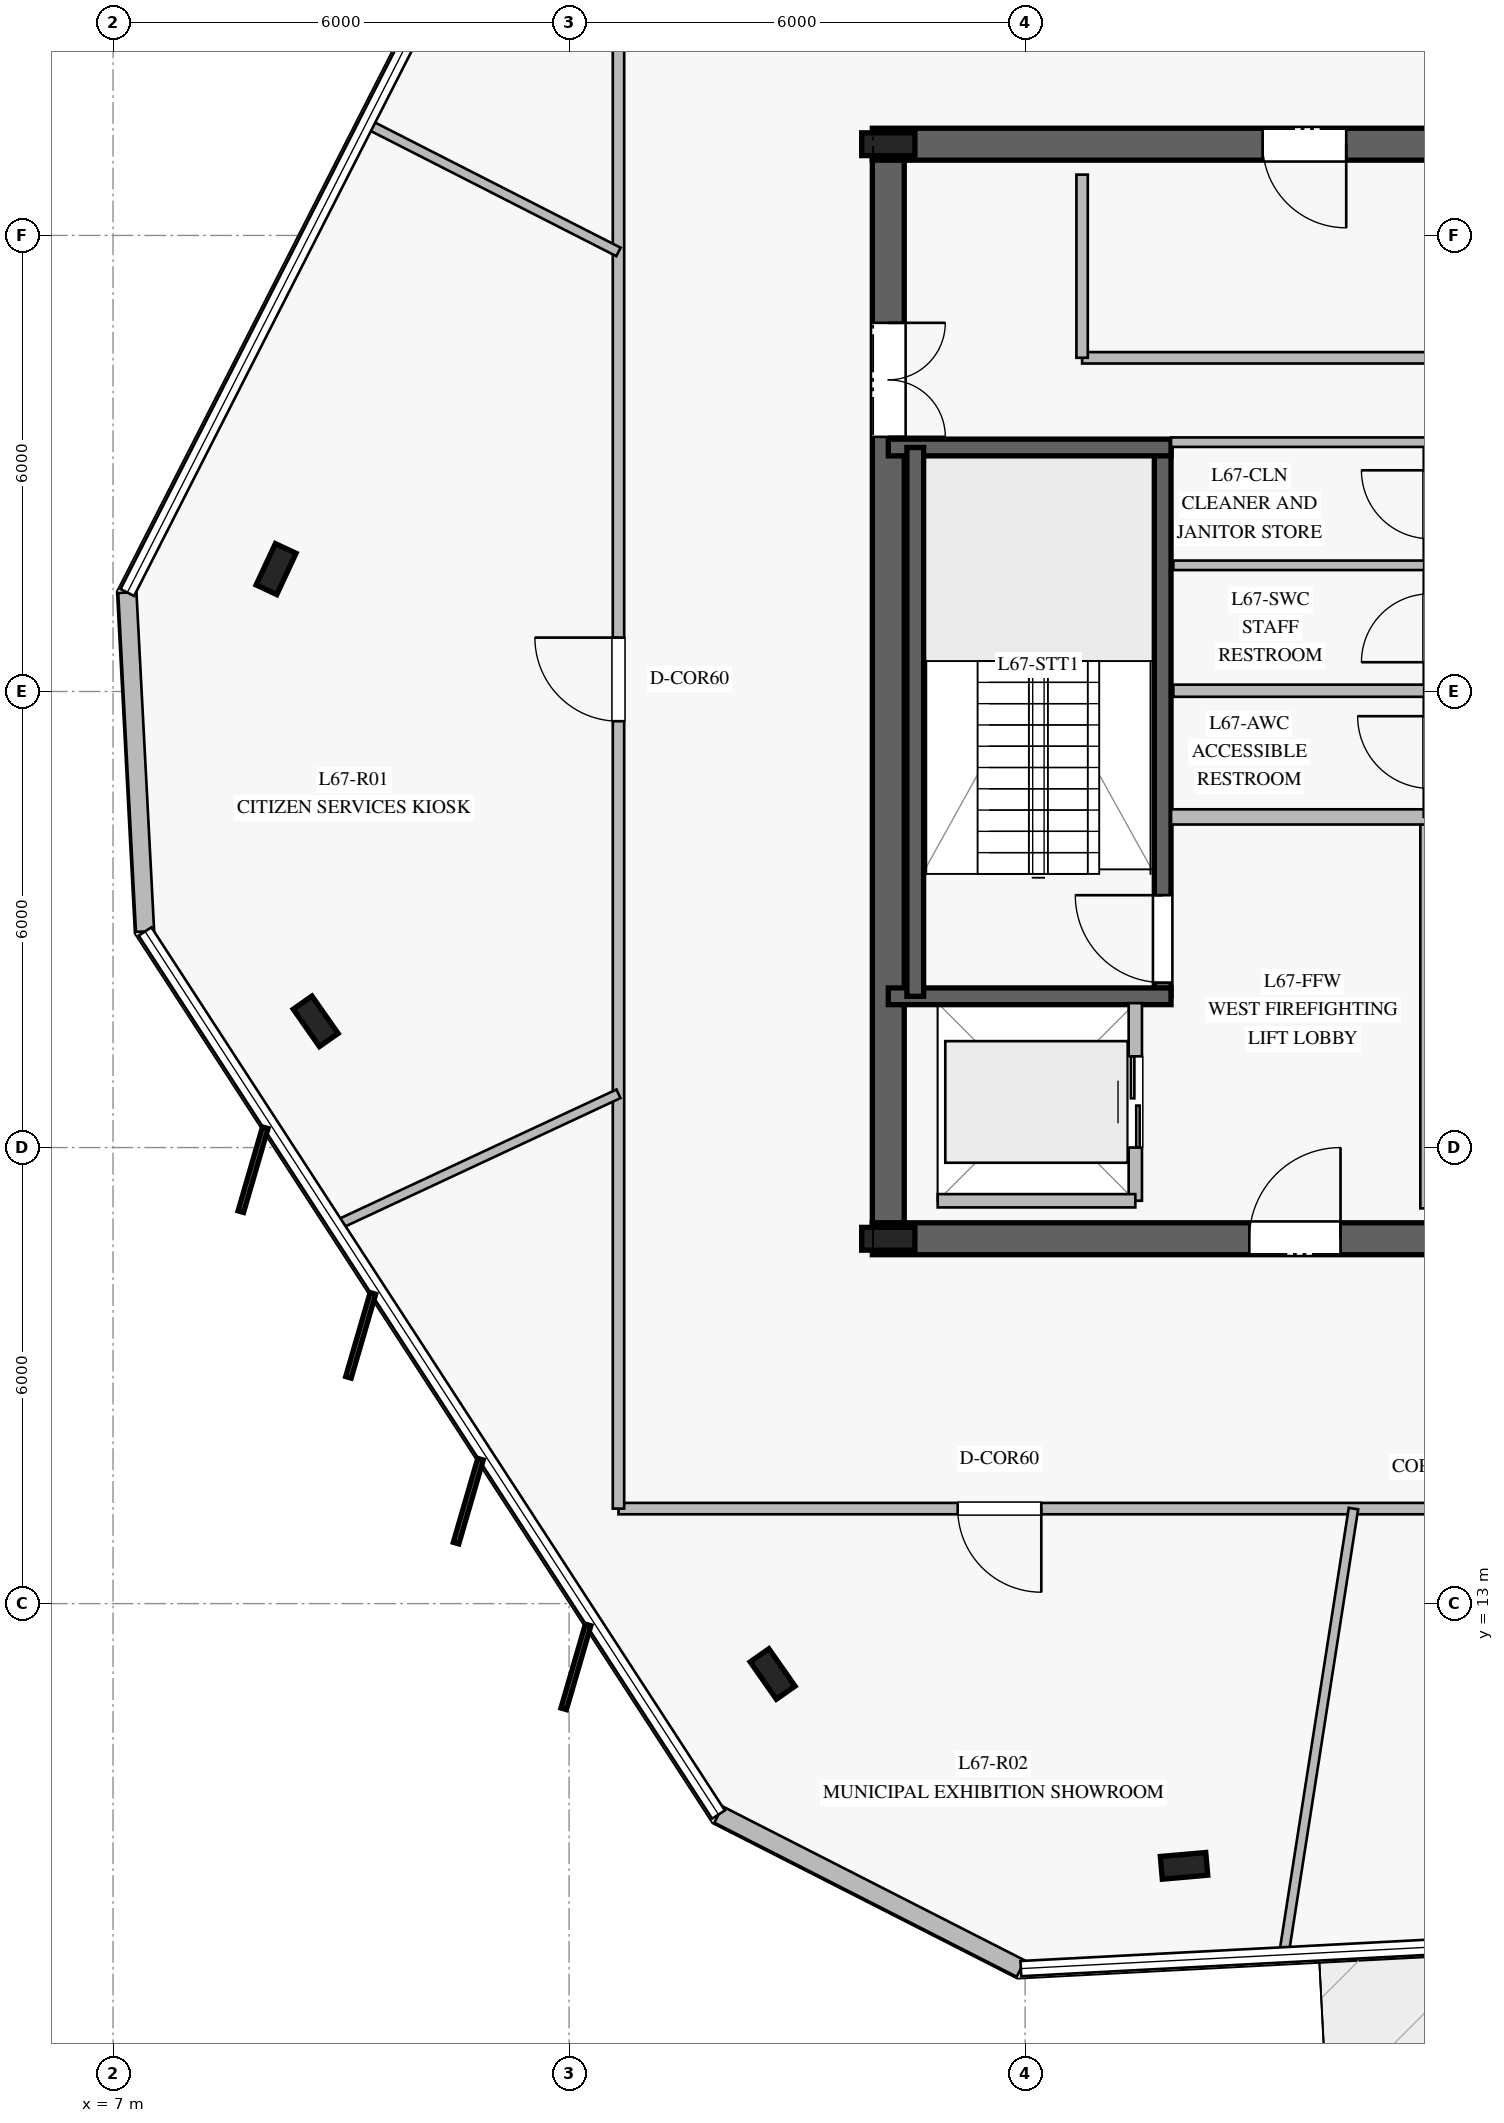
"""IFC4 building model, lengths in metres.
Left out: names, types, materials, properties, quantities, classifications, styles, units other than length and angle.
Written with IfcOpenShell. Run it as: python <this file> out.ifc"""

import sys

from ifc_helpers import new_model, si_unit, direction, frame, frame_2d, origin, origin_2d, place, context, subcontext, project, spatial, rectangle, i_section, extrude, element, fill, save


model = new_model("IFC4")
c1 = context("Model", 3, precision=1e-05, world=origin(), true_north=direction((0.0, 1.0)))
c2 = subcontext(c1, "Body", "Model", "MODEL_VIEW")
j1 = project(units=[si_unit("LENGTHUNIT", "METRE"), si_unit("PLANEANGLEUNIT", "RADIAN")], contexts=[c1])
p1 = place(None, origin())
s1 = spatial("IfcSite", under=j1, at=p1, CompositionType="ELEMENT")
p2 = place(p1, origin())
s2 = spatial("IfcBuilding", under=s1, at=p2, CompositionType="ELEMENT")
p3 = place(p2, frame((0.0, 0.0, 278.2)))
s3 = spatial("IfcBuildingStorey", under=s2, at=p3, CompositionType="ELEMENT", Elevation=278.2)
p4 = place(p3, frame((16.99, 17.8, 0.0), z_axis=(0.0, 0.0, 1.0), x_axis=(1.0, 0.0, 0.0)))
e1 = element("IfcWall", 1, at=p4, inside=s3, PredefinedType="SHEAR", context=c2, shape_type="SweptSolid", body=[
    extrude(rectangle(XDim=16.02, YDim=0.42, at=frame_2d((8.01, 0.0))), origin(), (0.0, 0.0, 1.0), 3.78),
])
p5 = place(p4, frame((4.96, 0.0, 0.0)))
e2 = element("IfcOpeningElement", 2, at=p5, cuts=e1, PredefinedType="OPENING", context=c2, shape_type="SweptSolid", body=[
    extrude(rectangle(XDim=1.2, YDim=2.25, at=frame_2d((0.6, 1.125))), frame((0.0, 0.22, 0.0), z_axis=(0.0, -1.0, 0.0), x_axis=(1.0, 0.0, 0.0)), (0.0, 0.0, 1.0), 0.44),
])
p6 = place(p4, frame((13.91, 0.0, 0.0)))
e3 = element("IfcOpeningElement", 3, at=p6, cuts=e1, PredefinedType="OPENING", context=c2, shape_type="SweptSolid", body=[
    extrude(rectangle(XDim=0.9, YDim=2.1, at=frame_2d((0.45, 1.05))), frame((0.0, 0.22, 0.0), z_axis=(0.0, -1.0, 0.0), x_axis=(1.0, 0.0, 0.0)), (0.0, 0.0, 1.0), 0.44),
])
p7 = place(p4, frame((9.16, 0.0, 0.0)))
e4 = element("IfcOpeningElement", 4, at=p7, cuts=e1, PredefinedType="OPENING", context=c2, shape_type="SweptSolid", body=[
    extrude(rectangle(XDim=1.1, YDim=2.2, at=frame_2d((0.55, 1.1))), frame((0.0, 0.22, 0.0), z_axis=(0.0, -1.0, 0.0), x_axis=(1.0, 0.0, 0.0)), (0.0, 0.0, 1.0), 0.44),
])
p8 = place(p3, frame((33.01, 32.2, 0.0), z_axis=(0.0, 0.0, 1.0), x_axis=(-1.0, 0.0, 0.0)))
e5 = element("IfcWall", 5, at=p8, inside=s3, PredefinedType="SHEAR", context=c2, shape_type="SweptSolid", body=[
    extrude(rectangle(XDim=16.02, YDim=0.42, at=frame_2d((8.01, 0.0))), origin(), (0.0, 0.0, 1.0), 3.78),
])
p9 = place(p8, frame((4.96, 0.0, 0.0)))
e6 = element("IfcOpeningElement", 6, at=p9, cuts=e5, PredefinedType="OPENING", context=c2, shape_type="SweptSolid", body=[
    extrude(rectangle(XDim=1.2, YDim=2.25, at=frame_2d((0.6, 1.125))), frame((0.0, 0.22, 0.0), z_axis=(0.0, -1.0, 0.0), x_axis=(1.0, 0.0, 0.0)), (0.0, 0.0, 1.0), 0.44),
])
p10 = place(p8, frame((9.785, 0.0, 0.0)))
e7 = element("IfcOpeningElement", 7, at=p10, cuts=e5, PredefinedType="OPENING", context=c2, shape_type="SweptSolid", body=[
    extrude(rectangle(XDim=1.1, YDim=2.2, at=frame_2d((0.55, 1.1))), frame((0.0, 0.22, 0.0), z_axis=(0.0, -1.0, 0.0), x_axis=(1.0, 0.0, 0.0)), (0.0, 0.0, 1.0), 0.44),
])
p11 = place(p3, frame((17.2, 31.99, 0.0), z_axis=(0.0, 0.0, 1.0), x_axis=(0.0, -1.0, 0.0)))
e8 = element("IfcWall", 8, at=p11, inside=s3, PredefinedType="SHEAR", context=c2, shape_type="SweptSolid", body=[
    extrude(rectangle(XDim=13.98, YDim=0.42, at=frame_2d((6.99, 0.0))), origin(), (0.0, 0.0, 1.0), 3.78),
])
p12 = place(p11, frame((2.14, 0.0, 0.0)))
e9 = element("IfcOpeningElement", 9, at=p12, cuts=e8, PredefinedType="OPENING", context=c2, shape_type="SweptSolid", body=[
    extrude(rectangle(XDim=1.5, YDim=2.2, at=frame_2d((0.75, 1.1))), frame((0.0, 0.22, 0.0), z_axis=(0.0, -1.0, 0.0), x_axis=(1.0, 0.0, 0.0)), (0.0, 0.0, 1.0), 0.44),
])
for number, where, z_axis, x_axis in (
    (10, (17.2, 17.8, 0.0), (0.0, 0.0, 1.0), (1.0, 0.0, 0.0)),
    (11, (17.2, 32.2, 0.0), (0.0, 0.0, 1.0), (1.0, 0.0, 0.0)),
):
    element("IfcColumn", number, at=place(p3, frame(where, z_axis=z_axis, x_axis=x_axis)), inside=s3, PredefinedType="COLUMN", context=c2, shape_type="SweptSolid", body=[
        extrude(i_section(OverallWidth=0.3, OverallDepth=0.7, WebThickness=0.017, FlangeThickness=0.032, at=origin_2d()), origin(), (0.0, 0.0, 1.0), 4.0),
    ])
p13 = place(p3, frame((20.81, 20.99, 0.0), z_axis=(0.0, 0.0, 1.0), x_axis=(0.0, 1.0, 0.0)))
e12 = element("IfcWall", 12, at=p13, inside=s3, PredefinedType="SOLIDWALL", context=c2, shape_type="SweptSolid", body=[
    extrude(rectangle(XDim=7.22, YDim=0.22, at=frame_2d((3.61, 0.0))), origin(), (0.0, 0.0, 1.0), 3.78),
])
p14 = place(p13, frame((0.18, 0.0, 0.0)))
e13 = element("IfcOpeningElement", 13, at=p14, cuts=e12, PredefinedType="OPENING", context=c2, shape_type="SweptSolid", body=[
    extrude(rectangle(XDim=1.15, YDim=2.2, at=frame_2d((0.575, 1.1))), frame((0.0, 0.12, 0.0), z_axis=(0.0, -1.0, 0.0), x_axis=(1.0, 0.0, 0.0)), (0.0, 0.0, 1.0), 0.24),
])
for number, where, z_axis, x_axis in (
    (14, (17.2, 20.99, 0.0), (0.0, 0.0, 1.0), (1.0, 0.0, 0.0)),
    (15, (17.2, 28.21, 0.0), (0.0, 0.0, 1.0), (1.0, 0.0, 0.0)),
):
    element("IfcWall", number, at=place(p3, frame(where, z_axis=z_axis, x_axis=x_axis)), inside=s3, PredefinedType="SOLIDWALL", context=c2, shape_type="SweptSolid", body=[
        extrude(rectangle(XDim=3.72, YDim=0.22, at=frame_2d((1.86, 0.0))), origin(), (0.0, 0.0, 1.0), 3.78),
    ])
p15 = place(p3, frame((17.555, 28.21, 0.0), z_axis=(0.0, 0.0, 1.0), x_axis=(0.0, -1.0, 0.0)))
e16 = element("IfcWall", 16, at=p15, inside=s3, PredefinedType="SOLIDWALL", context=c2, shape_type="SweptSolid", body=[
    extrude(rectangle(XDim=7.22, YDim=0.22, at=frame_2d((3.61, 0.0))), origin(), (0.0, 0.0, 1.0), 3.78),
])
for number, where, z_axis, x_axis in (
    (17, (9.145, 26.61, 0.0), (0.0, 0.0, 1.0), (0.423, 0.906, 0.0)),
    (18, (9.666, 20.661, 0.0), (0.0, 0.0, 1.0), (-0.574, 0.819, 0.0)),
    (19, (15.678, 12.074, 0.0), (0.0, 0.0, 1.0), (-0.574, 0.819, 0.0)),
    (20, (21.091, 9.55, 0.0), (0.0, 0.0, 1.0), (0.996, 0.087, 0.0)),
):
    element("IfcColumn", number, at=place(p3, frame(where, z_axis=z_axis, x_axis=x_axis)), inside=s3, PredefinedType="COLUMN", context=c2, shape_type="SweptSolid", body=[
        extrude(i_section(OverallWidth=0.3, OverallDepth=0.6, WebThickness=0.015, FlangeThickness=0.03, at=origin_2d()), origin(), (0.0, 0.0, 1.0), 4.0),
    ])
p16 = place(p3, frame((7.188, 26.302, 0.0), z_axis=(0.0, 0.0, 1.0), x_axis=(0.052162791258, -0.998638594892, 0.0)))
e21 = element("IfcWall", 21, at=p16, inside=s3, PredefinedType="STANDARD", context=c2, shape_type="SweptSolid", body=[
    extrude(rectangle(XDim=4.465, YDim=0.24, at=frame_2d((2.232, 0.0))), origin(), (0.0, 0.0, 1.0), 3.78),
])
p17 = place(p3, frame((14.966, 10.225, 0.0), z_axis=(0.0, 0.0, 1.0), x_axis=(0.890988997793, -0.454024895586, 0.0)))
e22 = element("IfcWall", 22, at=p17, inside=s3, PredefinedType="STANDARD", context=c2, shape_type="SweptSolid", body=[
    extrude(rectangle(XDim=4.465, YDim=0.24, at=frame_2d((2.232, 0.0))), origin(), (0.0, 0.0, 1.0), 3.78),
])
p18 = place(p3, frame((24.3, 18.2, 0.0), z_axis=(0.0, 0.0, 1.0), x_axis=(0.0, 1.0, 0.0)))
e23 = element("IfcWall", 23, at=p18, inside=s3, PredefinedType="PARTITIONING", context=c2, shape_type="SweptSolid", body=[
    extrude(rectangle(XDim=5.15, YDim=0.2, at=frame_2d((2.575, 0.0))), origin(), (0.0, 0.0, 1.0), 3.78),
])
p19 = place(p3, frame((20.92, 23.35, 0.0), z_axis=(0.0, 0.0, 1.0), x_axis=(1.0, 0.0, 0.0)))
e24 = element("IfcWall", 24, at=p19, inside=s3, PredefinedType="PARTITIONING", context=c2, shape_type="SweptSolid", body=[
    extrude(rectangle(XDim=3.38, YDim=0.2, at=frame_2d((1.69, 0.0))), origin(), (0.0, 0.0, 1.0), 3.78),
])
p20 = place(p3, frame((20.92, 28.28, 0.0), z_axis=(0.0, 0.0, 1.0), x_axis=(1.0, 0.0, 0.0)))
e25 = element("IfcWall", 25, at=p20, inside=s3, PredefinedType="PARTITIONING", context=c2, shape_type="SweptSolid", body=[
    extrude(rectangle(XDim=3.405, YDim=0.125, at=frame_2d((1.703, 0.0))), origin(), (0.0, 0.0, 1.0), 3.78),
])
p21 = place(p3, frame((20.95, 25.01, 0.0), z_axis=(0.0, 0.0, 1.0), x_axis=(1.0, 0.0, 0.0)))
e26 = element("IfcWall", 26, at=p21, inside=s3, PredefinedType="PLUMBINGWALL", context=c2, shape_type="SweptSolid", body=[
    extrude(rectangle(XDim=3.3, YDim=0.16, at=frame_2d((1.65, 0.0))), origin(), (0.0, 0.0, 1.0), 3.78),
])
p22 = place(p3, frame((20.95, 26.66, 0.0), z_axis=(0.0, 0.0, 1.0), x_axis=(1.0, 0.0, 0.0)))
e27 = element("IfcWall", 27, at=p22, inside=s3, PredefinedType="PARTITIONING", context=c2, shape_type="SweptSolid", body=[
    extrude(rectangle(XDim=3.3, YDim=0.125, at=frame_2d((1.65, 0.0))), origin(), (0.0, 0.0, 1.0), 3.78),
])
p23 = place(p3, frame((19.75, 29.39, 0.0), z_axis=(0.0, 0.0, 1.0), x_axis=(1.0, 0.0, 0.0)))
e28 = element("IfcWall", 28, at=p23, inside=s3, PredefinedType="PARTITIONING", context=c2, shape_type="SweptSolid", body=[
    extrude(rectangle(XDim=5.9, YDim=0.15, at=frame_2d((2.95, 0.0))), origin(), (0.0, 0.0, 1.0), 3.78),
])
p24 = place(p3, frame((19.75, 29.39, 0.0), z_axis=(0.0, 0.0, 1.0), x_axis=(0.0, 1.0, 0.0)))
e29 = element("IfcWall", 29, at=p24, inside=s3, PredefinedType="PARTITIONING", context=c2, shape_type="SweptSolid", body=[
    extrude(rectangle(XDim=2.41, YDim=0.15, at=frame_2d((1.205, 0.0))), origin(), (0.0, 0.0, 1.0), 3.78),
])
p25 = place(p3, frame((20.45, 18.3, 0.0), z_axis=(0.0, 0.0, 1.0), x_axis=(0.0, 1.0, 0.0)))
e30 = element("IfcWall", 30, at=p25, inside=s3, PredefinedType="PARTITIONING", context=c2, shape_type="SweptSolid", body=[
    extrude(rectangle(XDim=2.6, YDim=0.175, at=frame_2d((1.3, 0.0))), origin(), (0.0, 0.0, 1.0), 3.78),
])
p26 = place(p25, frame((0.7, 0.0, 0.0)))
e31 = element("IfcOpeningElement", 31, at=p26, cuts=e30, PredefinedType="OPENING", context=c2, shape_type="SweptSolid", body=[
    extrude(rectangle(XDim=1.2, YDim=2.2, at=frame_2d((0.6, 1.1))), frame((0.0, 0.098, 0.0), z_axis=(0.0, -1.0, 0.0), x_axis=(1.0, 0.0, 0.0)), (0.0, 0.0, 1.0), 0.195),
])
p27 = place(p3, frame((17.85, 18.3, 0.0), z_axis=(0.0, 0.0, 1.0), x_axis=(1.0, 0.0, 0.0)))
e32 = element("IfcWall", 32, at=p27, inside=s3, PredefinedType="PARTITIONING", context=c2, shape_type="SweptSolid", body=[
    extrude(rectangle(XDim=2.6, YDim=0.175, at=frame_2d((1.3, 0.0))), origin(), (0.0, 0.0, 1.0), 3.78),
])
p28 = place(p3, frame((36.35, 14.25, 0.0), z_axis=(0.0, 0.0, 1.0), x_axis=(-1.0, 0.0, 0.0)))
e33 = element("IfcWall", 33, at=p28, inside=s3, PredefinedType="PARTITIONING", context=c2, shape_type="SweptSolid", body=[
    extrude(rectangle(XDim=22.7, YDim=0.15, at=frame_2d((11.35, 0.0))), origin(), (0.0, 0.0, 1.0), 3.05),
])
p29 = place(p28, frame((17.137, 0.0, 0.0)))
e34 = element("IfcOpeningElement", 34, at=p29, cuts=e33, PredefinedType="OPENING", context=c2, shape_type="SweptSolid", body=[
    extrude(rectangle(XDim=1.1, YDim=2.2, at=frame_2d((0.55, 1.1))), frame((0.0, 0.085, 0.0), z_axis=(0.0, -1.0, 0.0), x_axis=(1.0, 0.0, 0.0)), (0.0, 0.0, 1.0), 0.17),
])
p30 = place(p28, frame((6.064, 0.0, 0.0)))
e35 = element("IfcOpeningElement", 35, at=p30, cuts=e33, PredefinedType="OPENING", context=c2, shape_type="SweptSolid", body=[
    extrude(rectangle(XDim=1.1, YDim=2.2, at=frame_2d((0.55, 1.1))), frame((0.0, 0.085, 0.0), z_axis=(0.0, -1.0, 0.0), x_axis=(1.0, 0.0, 0.0)), (0.0, 0.0, 1.0), 0.17),
])
p31 = place(p3, frame((13.65, 14.25, 0.0), z_axis=(0.0, 0.0, 1.0), x_axis=(0.0, 1.0, 0.0)))
e36 = element("IfcWall", 36, at=p31, inside=s3, PredefinedType="PARTITIONING", context=c2, shape_type="SweptSolid", body=[
    extrude(rectangle(XDim=21.5, YDim=0.15, at=frame_2d((10.75, 0.0))), origin(), (0.0, 0.0, 1.0), 3.22),
])
p32 = place(p31, frame((10.359, 0.0, 0.0)))
e37 = element("IfcOpeningElement", 37, at=p32, cuts=e36, PredefinedType="OPENING", context=c2, shape_type="SweptSolid", body=[
    extrude(rectangle(XDim=1.1, YDim=2.2, at=frame_2d((0.55, 1.1))), frame((0.0, 0.085, 0.0), z_axis=(0.0, -1.0, 0.0), x_axis=(1.0, 0.0, 0.0)), (0.0, 0.0, 1.0), 0.17),
])
p33 = place(p3, frame((13.65, 30.783, 0.0), z_axis=(0.0, 0.0, 1.0), x_axis=(-0.890937484948, 0.454125971416, 0.0)))
e38 = element("IfcWall", 38, at=p33, inside=s3, PredefinedType="PARTITIONING", context=c2, shape_type="SweptSolid", body=[
    extrude(rectangle(XDim=3.708, YDim=0.125, at=frame_2d((1.854, 0.0))), origin(), (0.0, 0.0, 1.0), 3.28),
])
p34 = place(p3, frame((13.65, 19.707, 0.0), z_axis=(0.0, 0.0, 1.0), x_axis=(-0.906322049944, -0.422587673489, 0.0)))
e39 = element("IfcWall", 39, at=p34, inside=s3, PredefinedType="PARTITIONING", context=c2, shape_type="SweptSolid", body=[
    extrude(rectangle(XDim=4.084, YDim=0.125, at=frame_2d((2.042, 0.0))), origin(), (0.0, 0.0, 1.0), 3.22),
])
p35 = place(p3, frame((23.32, 14.25, 0.0), z_axis=(0.0, 0.0, 1.0), x_axis=(-0.154248687159, -0.988032055406, 0.0)))
e40 = element("IfcWall", 40, at=p35, inside=s3, PredefinedType="PARTITIONING", context=c2, shape_type="SweptSolid", body=[
    extrude(rectangle(XDim=5.926, YDim=0.125, at=frame_2d((2.963, 0.0))), origin(), (0.0, 0.0, 1.0), 3.05),
])
p36 = place(p14, origin())
e41 = element("IfcDoor", 41, at=p36, inside=s3, OperationType="SINGLE_SWING_RIGHT", PredefinedType="DOOR", context=c2, shape_type="SweptSolid", body=[
    extrude(rectangle(XDim=1.15, YDim=2.2, at=frame_2d((0.575, 1.1))), frame((0.0, 0.025, 0.0), z_axis=(0.0, -1.0, 0.0), x_axis=(1.0, 0.0, 0.0)), (0.0, 0.0, 1.0), 0.05),
])
fill(e13, e41)
p37 = place(p5, origin())
e42 = element("IfcDoor", 42, at=p37, inside=s3, OperationType="SINGLE_SWING_RIGHT", PredefinedType="DOOR", context=c2, shape_type="SweptSolid", body=[
    extrude(rectangle(XDim=1.2, YDim=2.25, at=frame_2d((0.6, 1.125))), frame((0.0, 0.025, 0.0), z_axis=(0.0, -1.0, 0.0), x_axis=(1.0, 0.0, 0.0)), (0.0, 0.0, 1.0), 0.05),
])
fill(e2, e42)
p38 = place(p12, origin())
e43 = element("IfcDoor", 43, at=p38, inside=s3, OperationType="DOUBLE_DOOR_SINGLE_SWING", PredefinedType="DOOR", context=c2, shape_type="SweptSolid", body=[
    extrude(rectangle(XDim=1.5, YDim=2.2, at=frame_2d((0.75, 1.1))), frame((0.0, 0.025, 0.0), z_axis=(0.0, -1.0, 0.0), x_axis=(1.0, 0.0, 0.0)), (0.0, 0.0, 1.0), 0.05),
])
fill(e9, e43)
p39 = place(p10, origin())
e44 = element("IfcDoor", 44, at=p39, inside=s3, OperationType="SINGLE_SWING_LEFT", PredefinedType="DOOR", context=c2, shape_type="SweptSolid", body=[
    extrude(rectangle(XDim=1.1, YDim=2.2, at=frame_2d((0.55, 1.1))), frame((0.0, 0.025, 0.0), z_axis=(0.0, -1.0, 0.0), x_axis=(1.0, 0.0, 0.0)), (0.0, 0.0, 1.0), 0.05),
])
fill(e7, e44)
p40 = place(p26, origin())
e45 = element("IfcDoor", 45, at=p40, inside=s3, OperationType="DOUBLE_DOOR_SLIDING", PredefinedType="DOOR", context=c2, shape_type="SweptSolid", body=[
    extrude(rectangle(XDim=1.2, YDim=2.2, at=frame_2d((0.6, 1.1))), frame((0.0, 0.025, 0.0), z_axis=(0.0, -1.0, 0.0), x_axis=(1.0, 0.0, 0.0)), (0.0, 0.0, 1.0), 0.05),
])
fill(e31, e45)
p41 = place(p32, origin())
e46 = element("IfcDoor", 46, at=p41, inside=s3, OperationType="SINGLE_SWING_RIGHT", PredefinedType="DOOR", context=c2, shape_type="SweptSolid", body=[
    extrude(rectangle(XDim=1.1, YDim=2.2, at=frame_2d((0.55, 1.1))), frame((0.0, 0.025, 0.0), z_axis=(0.0, -1.0, 0.0), x_axis=(1.0, 0.0, 0.0)), (0.0, 0.0, 1.0), 0.05),
])
fill(e37, e46)
p42 = place(p29, origin())
e47 = element("IfcDoor", 47, at=p42, inside=s3, OperationType="SINGLE_SWING_LEFT", PredefinedType="DOOR", context=c2, shape_type="SweptSolid", body=[
    extrude(rectangle(XDim=1.1, YDim=2.2, at=frame_2d((0.55, 1.1))), frame((0.0, 0.025, 0.0), z_axis=(0.0, -1.0, 0.0), x_axis=(1.0, 0.0, 0.0)), (0.0, 0.0, 1.0), 0.05),
])
fill(e34, e47)
save(model, sys.argv[1])
